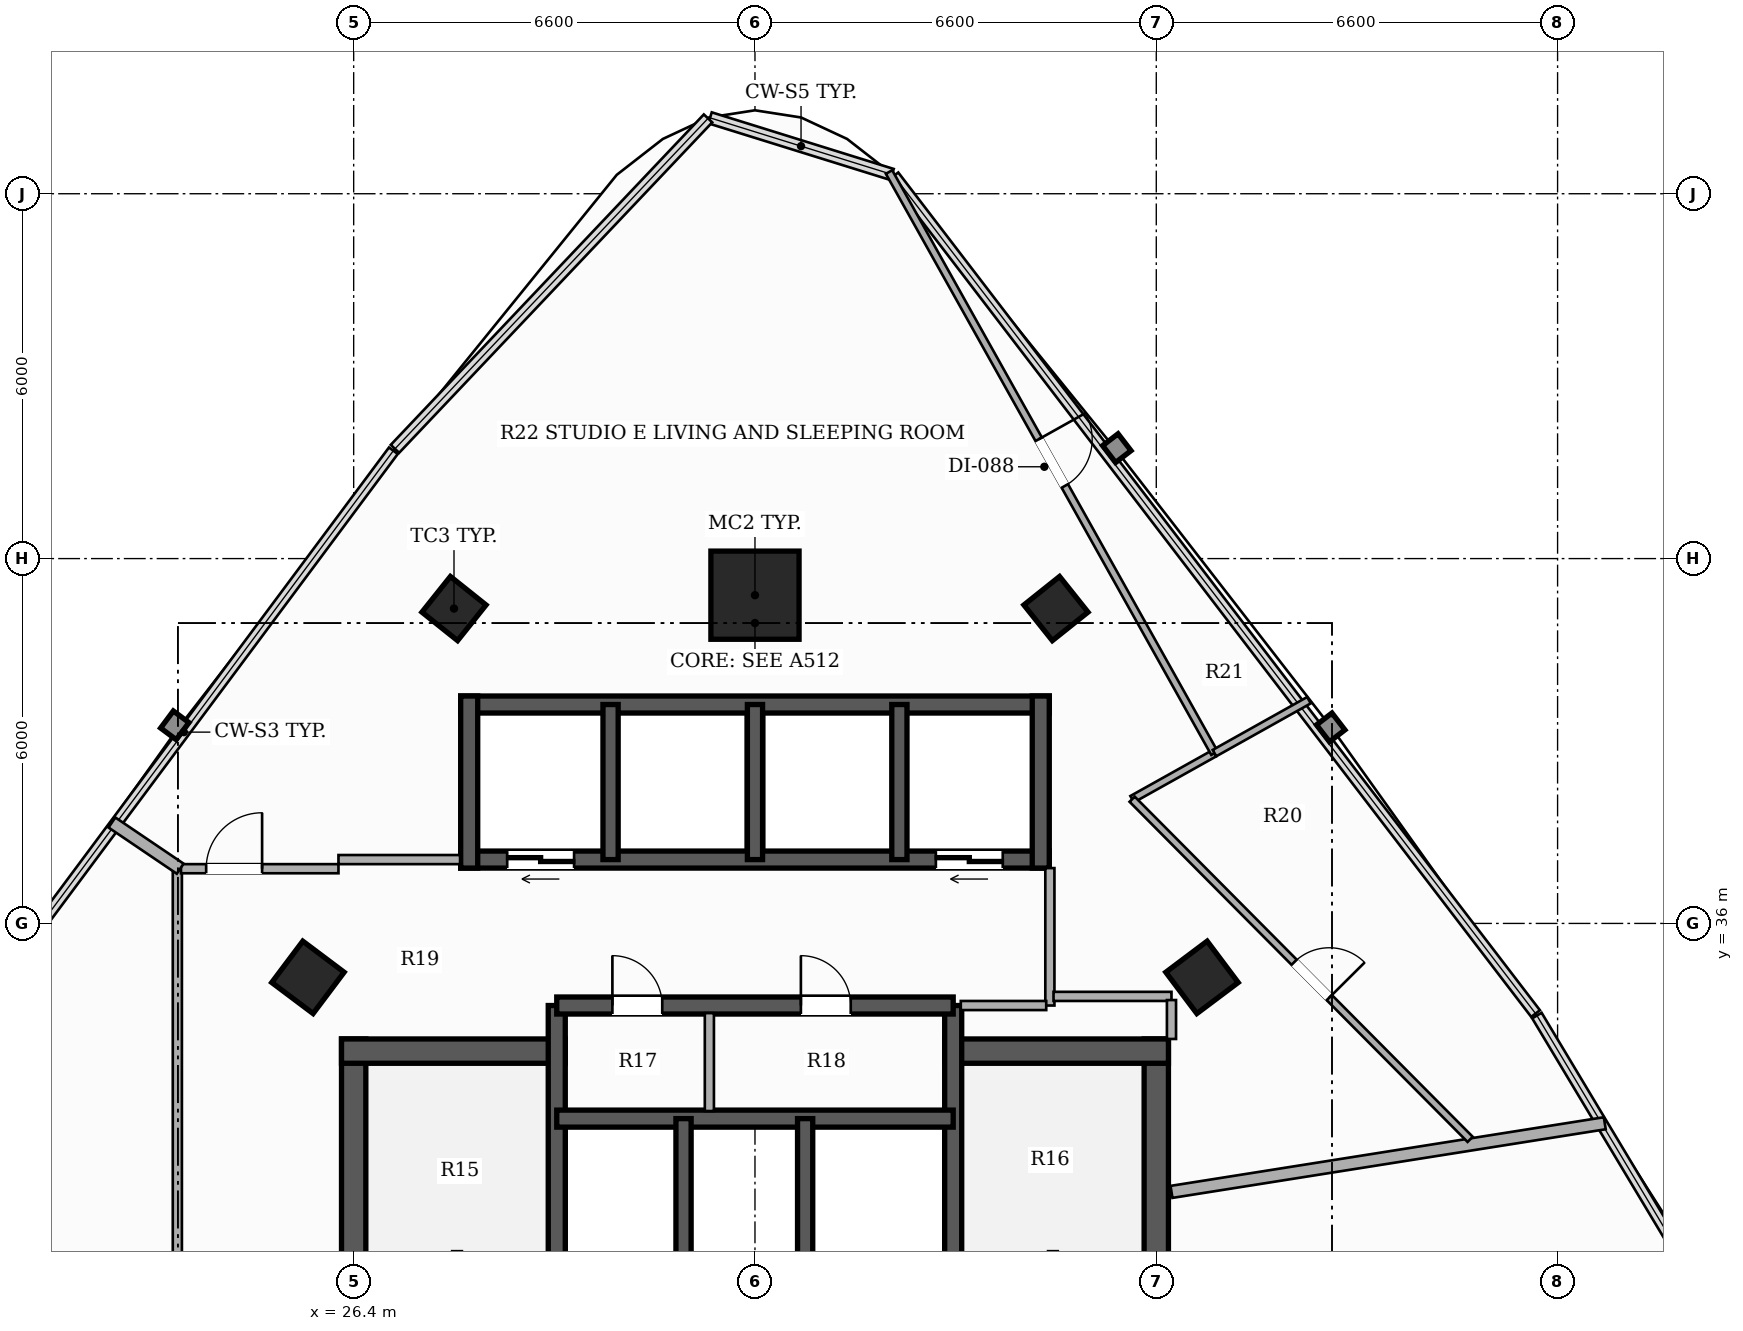
"""IFC4 building model, lengths in metres.
Left out: names, types, materials, properties, quantities, classifications, styles, units other than length and angle.
Written with IfcOpenShell. Run it as: python <this file> out.ifc"""

import sys

from ifc_helpers import new_model, si_unit, direction, frame, frame_2d, origin, origin_2d, place, context, subcontext, project, spatial, rectangle, hollow_rectangle, extrude, element, fill, save


model = new_model("IFC4")
c1 = context("Model", 3, precision=1e-05, world=origin(), true_north=direction((0.0, 1.0)))
c2 = subcontext(c1, "Body", "Model", "MODEL_VIEW")
j1 = project(units=[si_unit("LENGTHUNIT", "METRE"), si_unit("PLANEANGLEUNIT", "RADIAN")], contexts=[c1])
p1 = place(None, origin())
s1 = spatial("IfcSite", under=j1, at=p1, CompositionType="ELEMENT")
p2 = place(p1, origin())
s2 = spatial("IfcBuilding", under=s1, at=p2, CompositionType="ELEMENT")
p3 = place(p2, frame((0.0, 0.0, 116.6)))
s3 = spatial("IfcBuildingStorey", under=s2, at=p3, CompositionType="ELEMENT", Elevation=116.6)
p4 = place(p3, frame((26.4, 26.5, 0.0), z_axis=(0.0, 0.0, 1.0), x_axis=(0.0, 1.0, 0.0)))
e1 = element("IfcWall", 1, at=p4, inside=s3, PredefinedType="SHEAR", context=c2, shape_type="SweptSolid", body=[
    extrude(rectangle(XDim=7.6, YDim=0.4, at=frame_2d((3.8, 0.0))), origin(), (0.0, 0.0, 1.0), 3.3),
])
p5 = place(p3, frame((26.2, 33.9, 0.0), z_axis=(0.0, 0.0, 1.0), x_axis=(1.0, 0.0, 0.0)))
e2 = element("IfcWall", 2, at=p5, inside=s3, PredefinedType="SHEAR", context=c2, shape_type="SweptSolid", body=[
    extrude(rectangle(XDim=3.68, YDim=0.4, at=frame_2d((1.84, 0.0))), origin(), (0.0, 0.0, 1.0), 3.3),
])
p6 = place(p3, frame((39.6, 26.5, 0.0), z_axis=(0.0, 0.0, 1.0), x_axis=(0.0, 1.0, 0.0)))
e3 = element("IfcWall", 3, at=p6, inside=s3, PredefinedType="SHEAR", context=c2, shape_type="SweptSolid", body=[
    extrude(rectangle(XDim=7.6, YDim=0.4, at=frame_2d((3.8, 0.0))), origin(), (0.0, 0.0, 1.0), 3.3),
])
p7 = place(p3, frame((36.12, 33.9, 0.0), z_axis=(0.0, 0.0, 1.0), x_axis=(1.0, 0.0, 0.0)))
e4 = element("IfcWall", 4, at=p7, inside=s3, PredefinedType="SHEAR", context=c2, shape_type="SweptSolid", body=[
    extrude(rectangle(XDim=3.68, YDim=0.4, at=frame_2d((1.84, 0.0))), origin(), (0.0, 0.0, 1.0), 3.3),
])
p8 = place(p3, frame((29.74, 26.5, 0.0), z_axis=(0.0, 0.0, 1.0), x_axis=(0.0, 1.0, 0.0)))
e5 = element("IfcWall", 5, at=p8, inside=s3, PredefinedType="SHEAR", context=c2, shape_type="SweptSolid", body=[
    extrude(rectangle(XDim=8.15, YDim=0.28, at=frame_2d((4.075, 0.0))), origin(), (0.0, 0.0, 1.0), 3.3),
])
p9 = place(p8, frame((0.6, 0.0, 0.0)))
e6 = element("IfcOpeningElement", 6, at=p9, cuts=e5, PredefinedType="OPENING", context=c2, shape_type="SweptSolid", body=[
    extrude(rectangle(XDim=1.05, YDim=2.15, at=frame_2d((0.525, 1.075))), frame((0.0, 0.15, 0.0), z_axis=(0.0, -1.0, 0.0), x_axis=(1.0, 0.0, 0.0)), (0.0, 0.0, 1.0), 0.3),
])
p10 = place(p3, frame((36.26, 26.5, 0.0), z_axis=(0.0, 0.0, 1.0), x_axis=(0.0, 1.0, 0.0)))
e7 = element("IfcWall", 7, at=p10, inside=s3, PredefinedType="SHEAR", context=c2, shape_type="SweptSolid", body=[
    extrude(rectangle(XDim=8.15, YDim=0.28, at=frame_2d((4.075, 0.0))), origin(), (0.0, 0.0, 1.0), 3.3),
])
p11 = place(p10, frame((0.6, 0.0, 0.0)))
e8 = element("IfcOpeningElement", 8, at=p11, cuts=e7, PredefinedType="OPENING", context=c2, shape_type="SweptSolid", body=[
    extrude(rectangle(XDim=1.05, YDim=2.15, at=frame_2d((0.525, 1.075))), frame((0.0, 0.15, 0.0), z_axis=(0.0, -1.0, 0.0), x_axis=(1.0, 0.0, 0.0)), (0.0, 0.0, 1.0), 0.3),
])
p12 = place(p3, frame((29.74, 32.79, 0.0), z_axis=(0.0, 0.0, 1.0), x_axis=(1.0, 0.0, 0.0)))
e9 = element("IfcWall", 9, at=p12, inside=s3, PredefinedType="SHEAR", context=c2, shape_type="SweptSolid", body=[
    extrude(rectangle(XDim=6.52, YDim=0.28, at=frame_2d((3.26, 0.0))), origin(), (0.0, 0.0, 1.0), 3.3),
])
for number, where, z_axis, x_axis in (
    (10, (31.825, 29.89, 0.0), (0.0, 0.0, 1.0), (0.0, 1.0, 0.0)),
    (11, (33.825, 29.89, 0.0), (0.0, 0.0, 1.0), (0.0, 1.0, 0.0)),
):
    element("IfcWall", number, at=place(p3, frame(where, z_axis=z_axis, x_axis=x_axis)), inside=s3, PredefinedType="SHEAR", context=c2, shape_type="SweptSolid", body=[
        extrude(rectangle(XDim=2.9, YDim=0.25, at=frame_2d((1.45, 0.0))), origin(), (0.0, 0.0, 1.0), 3.3),
    ])
p13 = place(p3, frame((29.74, 34.65, 0.0), z_axis=(0.0, 0.0, 1.0), x_axis=(1.0, 0.0, 0.0)))
e12 = element("IfcWall", 12, at=p13, inside=s3, PredefinedType="SHEAR", context=c2, shape_type="SweptSolid", body=[
    extrude(rectangle(XDim=6.52, YDim=0.28, at=frame_2d((3.26, 0.0))), origin(), (0.0, 0.0, 1.0), 3.3),
])
p14 = place(p13, frame((0.915, 0.0, 0.0)))
e13 = element("IfcOpeningElement", 13, at=p14, cuts=e12, PredefinedType="OPENING", context=c2, shape_type="SweptSolid", body=[
    extrude(rectangle(XDim=0.82, YDim=2.1, at=frame_2d((0.41, 1.05))), frame((0.0, 0.15, 0.0), z_axis=(0.0, -1.0, 0.0), x_axis=(1.0, 0.0, 0.0)), (0.0, 0.0, 1.0), 0.3),
])
p15 = place(p13, frame((4.015, 0.0, 0.0)))
e14 = element("IfcOpeningElement", 14, at=p15, cuts=e12, PredefinedType="OPENING", context=c2, shape_type="SweptSolid", body=[
    extrude(rectangle(XDim=0.82, YDim=2.1, at=frame_2d((0.41, 1.05))), frame((0.0, 0.15, 0.0), z_axis=(0.0, -1.0, 0.0), x_axis=(1.0, 0.0, 0.0)), (0.0, 0.0, 1.0), 0.3),
])
p16 = place(p3, frame((37.84, 37.05, 0.0), z_axis=(0.0, 0.0, 1.0), x_axis=(-1.0, 0.0, 0.0)))
e15 = element("IfcWall", 15, at=p16, inside=s3, PredefinedType="SHEAR", context=c2, shape_type="SweptSolid", body=[
    extrude(rectangle(XDim=9.68, YDim=0.28, at=frame_2d((4.84, 0.0))), origin(), (0.0, 0.0, 1.0), 3.3),
])
p17 = place(p16, frame((7.815, 0.0, 0.0)))
e16 = element("IfcOpeningElement", 16, at=p17, cuts=e15, PredefinedType="OPENING", context=c2, shape_type="SweptSolid", body=[
    extrude(rectangle(XDim=1.1, YDim=2.2, at=frame_2d((0.55, 1.1))), frame((0.0, 0.15, 0.0), z_axis=(0.0, -1.0, 0.0), x_axis=(1.0, 0.0, 0.0)), (0.0, 0.0, 1.0), 0.3),
])
p18 = place(p16, frame((0.765, 0.0, 0.0)))
e17 = element("IfcOpeningElement", 17, at=p18, cuts=e15, PredefinedType="OPENING", context=c2, shape_type="SweptSolid", body=[
    extrude(rectangle(XDim=1.1, YDim=2.2, at=frame_2d((0.55, 1.1))), frame((0.0, 0.15, 0.0), z_axis=(0.0, -1.0, 0.0), x_axis=(1.0, 0.0, 0.0)), (0.0, 0.0, 1.0), 0.3),
])
p19 = place(p3, frame((28.16, 39.6, 0.0), z_axis=(0.0, 0.0, 1.0), x_axis=(1.0, 0.0, 0.0)))
e18 = element("IfcWall", 18, at=p19, inside=s3, PredefinedType="SHEAR", context=c2, shape_type="SweptSolid", body=[
    extrude(rectangle(XDim=9.68, YDim=0.28, at=frame_2d((4.84, 0.0))), origin(), (0.0, 0.0, 1.0), 3.3),
])
for number, where, z_axis, x_axis in (
    (19, (28.3, 36.91, 0.0), (0.0, 0.0, 1.0), (0.0, 1.0, 0.0)),
    (20, (37.7, 36.91, 0.0), (0.0, 0.0, 1.0), (0.0, 1.0, 0.0)),
):
    element("IfcWall", number, at=place(p3, frame(where, z_axis=z_axis, x_axis=x_axis)), inside=s3, PredefinedType="SHEAR", context=c2, shape_type="SweptSolid", body=[
        extrude(rectangle(XDim=2.83, YDim=0.28, at=frame_2d((1.415, 0.0))), origin(), (0.0, 0.0, 1.0), 3.3),
    ])
for number, where, z_axis, x_axis in (
    (21, (30.625, 37.05, 0.0), (0.0, 0.0, 1.0), (0.0, 1.0, 0.0)),
    (22, (33.0, 37.05, 0.0), (0.0, 0.0, 1.0), (0.0, 1.0, 0.0)),
    (23, (35.375, 37.05, 0.0), (0.0, 0.0, 1.0), (0.0, 1.0, 0.0)),
):
    element("IfcWall", number, at=place(p3, frame(where, z_axis=z_axis, x_axis=x_axis)), inside=s3, PredefinedType="SHEAR", context=c2, shape_type="SweptSolid", body=[
        extrude(rectangle(XDim=2.55, YDim=0.25, at=frame_2d((1.275, 0.0))), origin(), (0.0, 0.0, 1.0), 3.3),
    ])
p20 = place(p3, frame((33.0, 41.398, 0.0), z_axis=(0.0, 0.0, 1.0), x_axis=(1.0, 0.0, 0.0)))
e24 = element("IfcColumn", 24, at=p20, inside=s3, PredefinedType="COLUMN", context=c2, shape_type="SweptSolid", body=[
    extrude(hollow_rectangle(XDim=1.45, YDim=1.45, WallThickness=0.045, at=origin_2d()), origin(), (0.0, 0.0, 1.0), 3.3),
])
for number, where, z_axis, x_axis in (
    (25, (25.648, 35.113, 0.0), (0.0, 0.0, 1.0), (0.6, 0.8, 0.0)),
    (26, (40.352, 35.113, 0.0), (0.0, 0.0, 1.0), (-0.6, 0.8, 0.0)),
):
    element("IfcColumn", number, at=place(p3, frame(where, z_axis=z_axis, x_axis=x_axis)), inside=s3, PredefinedType="COLUMN", context=c2, shape_type="SweptSolid", body=[
        extrude(hollow_rectangle(XDim=0.85, YDim=0.85, WallThickness=0.028, at=origin_2d()), origin(), (0.0, 0.0, 1.0), 3.3),
    ])
for number, where, z_axis, x_axis in (
    (27, (28.05, 41.178, 0.0), (0.0, 0.0, 1.0), (0.624, 0.782, 0.0)),
    (28, (37.95, 41.178, 0.0), (0.0, 0.0, 1.0), (-0.624, 0.782, 0.0)),
):
    element("IfcColumn", number, at=place(p3, frame(where, z_axis=z_axis, x_axis=x_axis)), inside=s3, PredefinedType="COLUMN", context=c2, shape_type="SweptSolid", body=[
        extrude(hollow_rectangle(XDim=0.75, YDim=0.75, WallThickness=0.025, at=origin_2d()), origin(), (0.0, 0.0, 1.0), 3.3),
    ])
p21 = place(p3, frame((37.85, 34.65, 0.0), z_axis=(0.0, 0.0, 1.0), x_axis=(0.0, 1.0, 0.0)))
e29 = element("IfcWall", 29, at=p21, inside=s3, PredefinedType="PARTITIONING", context=c2, shape_type="SweptSolid", body=[
    extrude(rectangle(XDim=2.26, YDim=0.15, at=frame_2d((1.13, 0.0))), origin(), (0.0, 0.0, 1.0), 3.06),
])
p22 = place(p3, frame((36.385, 34.65, 0.0), z_axis=(0.0, 0.0, 1.0), x_axis=(1.0, 0.0, 0.0)))
e30 = element("IfcWall", 30, at=p22, inside=s3, PredefinedType="PARTITIONING", context=c2, shape_type="SweptSolid", body=[
    extrude(rectangle(XDim=1.405, YDim=0.15, at=frame_2d((0.703, 0.0))), origin(), (0.0, 0.0, 1.0), 2.425),
])
p23 = place(p3, frame((32.25, 32.915, 0.0), z_axis=(0.0, 0.0, 1.0), x_axis=(0.0, 1.0, 0.0)))
e31 = element("IfcWall", 31, at=p23, inside=s3, PredefinedType="PARTITIONING", context=c2, shape_type="SweptSolid", body=[
    extrude(rectangle(XDim=1.61, YDim=0.15, at=frame_2d((0.805, 0.0))), origin(), (0.0, 0.0, 1.0), 3.06),
])
p24 = place(p3, frame((23.5, 14.06, 0.0), z_axis=(0.0, 0.0, 1.0), x_axis=(0.0, 1.0, 0.0)))
e32 = element("IfcWall", 32, at=p24, inside=s3, PredefinedType="PARTITIONING", context=c2, shape_type="SweptSolid", body=[
    extrude(rectangle(XDim=22.84, YDim=0.15, at=frame_2d((11.42, 0.0))), origin(), (0.0, 0.0, 1.0), 2.413),
])
p25 = place(p24, frame((13.17, 0.0, 0.0)))
e33 = element("IfcOpeningElement", 33, at=p25, cuts=e32, PredefinedType="OPENING", context=c2, shape_type="SweptSolid", body=[
    extrude(rectangle(XDim=0.88, YDim=2.1, at=frame_2d((0.44, 1.05))), frame((0.0, 0.085, 0.0), z_axis=(0.0, -1.0, 0.0), x_axis=(1.0, 0.0, 0.0)), (0.0, 0.0, 1.0), 0.17),
])
p26 = place(p3, frame((23.56, 36.9, 0.0), z_axis=(0.0, 0.0, 1.0), x_axis=(1.0, 0.0, 0.0)))
e34 = element("IfcWall", 34, at=p26, inside=s3, PredefinedType="PARTITIONING", context=c2, shape_type="SweptSolid", body=[
    extrude(rectangle(XDim=2.59, YDim=0.15, at=frame_2d((1.295, 0.0))), origin(), (0.0, 0.0, 1.0), 2.413),
])
p27 = place(p26, frame((0.414, 0.0, 0.0)))
e35 = element("IfcOpeningElement", 35, at=p27, cuts=e34, PredefinedType="OPENING", context=c2, shape_type="SweptSolid", body=[
    extrude(rectangle(XDim=0.92, YDim=2.15, at=frame_2d((0.46, 1.075))), frame((0.0, 0.085, 0.0), z_axis=(0.0, -1.0, 0.0), x_axis=(1.0, 0.0, 0.0)), (0.0, 0.0, 1.0), 0.17),
])
p28 = place(p3, frame((26.15, 37.05, 0.0), z_axis=(0.0, 0.0, 1.0), x_axis=(1.0, 0.0, 0.0)))
e36 = element("IfcWall", 36, at=p28, inside=s3, PredefinedType="PARTITIONING", context=c2, shape_type="SweptSolid", body=[
    extrude(rectangle(XDim=2.0, YDim=0.15, at=frame_2d((1.0, 0.0))), origin(), (0.0, 0.0, 1.0), 2.413),
])
p29 = place(p3, frame((37.91, 34.8, 0.0), z_axis=(0.0, 0.0, 1.0), x_axis=(1.0, 0.0, 0.0)))
e37 = element("IfcWall", 37, at=p29, inside=s3, PredefinedType="PARTITIONING", context=c2, shape_type="SweptSolid", body=[
    extrude(rectangle(XDim=1.94, YDim=0.15, at=frame_2d((0.97, 0.0))), origin(), (0.0, 0.0, 1.0), 2.721),
])
p30 = place(p3, frame((39.85, 34.74, 0.0), z_axis=(0.0, 0.0, 1.0), x_axis=(0.0, -1.0, 0.0)))
e38 = element("IfcWall", 38, at=p30, inside=s3, PredefinedType="PARTITIONING", context=c2, shape_type="SweptSolid", body=[
    extrude(rectangle(XDim=0.64, YDim=0.15, at=frame_2d((0.32, 0.0))), origin(), (0.0, 0.0, 1.0), 2.721),
])
p31 = place(p3, frame((22.424, 37.66, 0.0), z_axis=(0.0, 0.0, 1.0), x_axis=(0.82818018374, -0.560461937388, 0.0)))
e39 = element("IfcWall", 39, at=p31, inside=s3, PredefinedType="PARTITIONING", context=c2, shape_type="SweptSolid", body=[
    extrude(rectangle(XDim=1.356, YDim=0.2, at=frame_2d((0.678, 0.0))), origin(), (0.0, 0.0, 1.0), 3.06),
])
p32 = place(p3, frame((46.976, 32.714, 0.0), z_axis=(0.0, 0.0, 1.0), x_axis=(-0.987677489662, -0.156502959767, 0.0)))
e40 = element("IfcWall", 40, at=p32, inside=s3, PredefinedType="PARTITIONING", context=c2, shape_type="SweptSolid", body=[
    extrude(rectangle(XDim=7.215, YDim=0.2, at=frame_2d((3.607, 0.0))), origin(), (0.0, 0.0, 1.0), 2.413),
])
p33 = place(p3, frame((40.557, 38.8, 0.0), z_axis=(0.0, 0.0, 1.0), x_axis=(-0.872825188639, -0.488032980521, 0.0)))
e41 = element("IfcWall", 41, at=p33, inside=s3, PredefinedType="PARTITIONING", context=c2, shape_type="SweptSolid", body=[
    extrude(rectangle(XDim=1.551, YDim=0.12, at=frame_2d((0.776, 0.0))), origin(), (0.0, 0.0, 1.0), 2.413),
])
p34 = place(p3, frame((39.203, 38.043, 0.0), z_axis=(0.0, 0.0, 1.0), x_axis=(0.704889894519, -0.709316739267, 0.0)))
e42 = element("IfcWall", 42, at=p34, inside=s3, PredefinedType="PARTITIONING", context=c2, shape_type="SweptSolid", body=[
    extrude(rectangle(XDim=7.886, YDim=0.12, at=frame_2d((3.943, 0.0))), origin(), (0.0, 0.0, 1.0), 2.413),
])
p35 = place(p34, frame((3.78, 0.0, 0.0)))
e43 = element("IfcOpeningElement", 43, at=p35, cuts=e42, PredefinedType="OPENING", context=c2, shape_type="SweptSolid", body=[
    extrude(rectangle(XDim=0.82, YDim=2.1, at=frame_2d((0.41, 1.05))), frame((0.0, 0.07, 0.0), z_axis=(0.0, -1.0, 0.0), x_axis=(1.0, 0.0, 0.0)), (0.0, 0.0, 1.0), 0.14),
])
p36 = place(p3, frame((35.205, 48.357, 0.0), z_axis=(0.0, 0.0, 1.0), x_axis=(0.488599975334, -0.872507916356, 0.0)))
e44 = element("IfcWall", 44, at=p36, inside=s3, PredefinedType="PARTITIONING", context=c2, shape_type="SweptSolid", body=[
    extrude(rectangle(XDim=10.953, YDim=0.12, at=frame_2d((5.477, 0.0))), origin(), (0.0, 0.0, 1.0), 2.619),
])
p37 = place(p36, frame((5.037, 0.0, 0.0)))
e45 = element("IfcOpeningElement", 45, at=p37, cuts=e44, PredefinedType="OPENING", context=c2, shape_type="SweptSolid", body=[
    extrude(rectangle(XDim=0.88, YDim=2.1, at=frame_2d((0.44, 1.05))), frame((0.0, 0.07, 0.0), z_axis=(0.0, -1.0, 0.0), x_axis=(1.0, 0.0, 0.0)), (0.0, 0.0, 1.0), 0.14),
])
p38 = place(p3, frame((40.557, 38.801, 0.0), z_axis=(0.0, 0.0, 1.0), x_axis=(0.872620527381, 0.488398828002, 0.0)))
e46 = element("IfcWall", 46, at=p38, inside=s3, PredefinedType="PARTITIONING", context=c2, shape_type="SweptSolid", body=[
    extrude(rectangle(XDim=1.781, YDim=0.12, at=frame_2d((0.891, 0.0))), origin(), (0.0, 0.0, 1.0), 3.06),
])
p39 = place(p17, origin())
e47 = element("IfcDoor", 47, at=p39, inside=s3, OperationType="DOUBLE_DOOR_SLIDING", PredefinedType="DOOR", context=c2, shape_type="SweptSolid", body=[
    extrude(rectangle(XDim=1.1, YDim=2.2, at=frame_2d((0.55, 1.1))), frame((0.0, 0.025, 0.0), z_axis=(0.0, -1.0, 0.0), x_axis=(1.0, 0.0, 0.0)), (0.0, 0.0, 1.0), 0.05),
])
fill(e16, e47)
p40 = place(p18, origin())
e48 = element("IfcDoor", 48, at=p40, inside=s3, OperationType="DOUBLE_DOOR_SLIDING", PredefinedType="DOOR", context=c2, shape_type="SweptSolid", body=[
    extrude(rectangle(XDim=1.1, YDim=2.2, at=frame_2d((0.55, 1.1))), frame((0.0, 0.025, 0.0), z_axis=(0.0, -1.0, 0.0), x_axis=(1.0, 0.0, 0.0)), (0.0, 0.0, 1.0), 0.05),
])
fill(e17, e48)
p41 = place(p14, origin())
e49 = element("IfcDoor", 49, at=p41, inside=s3, OperationType="SINGLE_SWING_LEFT", PredefinedType="DOOR", context=c2, shape_type="SweptSolid", body=[
    extrude(rectangle(XDim=0.82, YDim=2.1, at=frame_2d((0.41, 1.05))), frame((0.0, 0.025, 0.0), z_axis=(0.0, -1.0, 0.0), x_axis=(1.0, 0.0, 0.0)), (0.0, 0.0, 1.0), 0.05),
])
fill(e13, e49)
p42 = place(p15, origin())
e50 = element("IfcDoor", 50, at=p42, inside=s3, OperationType="SINGLE_SWING_LEFT", PredefinedType="DOOR", context=c2, shape_type="SweptSolid", body=[
    extrude(rectangle(XDim=0.82, YDim=2.1, at=frame_2d((0.41, 1.05))), frame((0.0, 0.025, 0.0), z_axis=(0.0, -1.0, 0.0), x_axis=(1.0, 0.0, 0.0)), (0.0, 0.0, 1.0), 0.05),
])
fill(e14, e50)
p43 = place(p27, origin())
e51 = element("IfcDoor", 51, at=p43, inside=s3, OperationType="SINGLE_SWING_RIGHT", PredefinedType="DOOR", context=c2, shape_type="SweptSolid", body=[
    extrude(rectangle(XDim=0.92, YDim=2.15, at=frame_2d((0.46, 1.075))), frame((0.0, 0.025, 0.0), z_axis=(0.0, -1.0, 0.0), x_axis=(1.0, 0.0, 0.0)), (0.0, 0.0, 1.0), 0.05),
])
fill(e35, e51)
p44 = place(p35, origin())
e52 = element("IfcDoor", 52, at=p44, inside=s3, OperationType="SINGLE_SWING_RIGHT", PredefinedType="DOOR", context=c2, shape_type="SweptSolid", body=[
    extrude(rectangle(XDim=0.82, YDim=2.1, at=frame_2d((0.41, 1.05))), frame((0.0, 0.025, 0.0), z_axis=(0.0, -1.0, 0.0), x_axis=(1.0, 0.0, 0.0)), (0.0, 0.0, 1.0), 0.05),
])
fill(e43, e52)
p45 = place(p37, origin())
e53 = element("IfcDoor", 53, at=p45, inside=s3, OperationType="SINGLE_SWING_LEFT", PredefinedType="DOOR", context=c2, shape_type="SweptSolid", body=[
    extrude(rectangle(XDim=0.88, YDim=2.1, at=frame_2d((0.44, 1.05))), frame((0.0, 0.025, 0.0), z_axis=(0.0, -1.0, 0.0), x_axis=(1.0, 0.0, 0.0)), (0.0, 0.0, 1.0), 0.05),
])
fill(e45, e53)
save(model, sys.argv[1])
